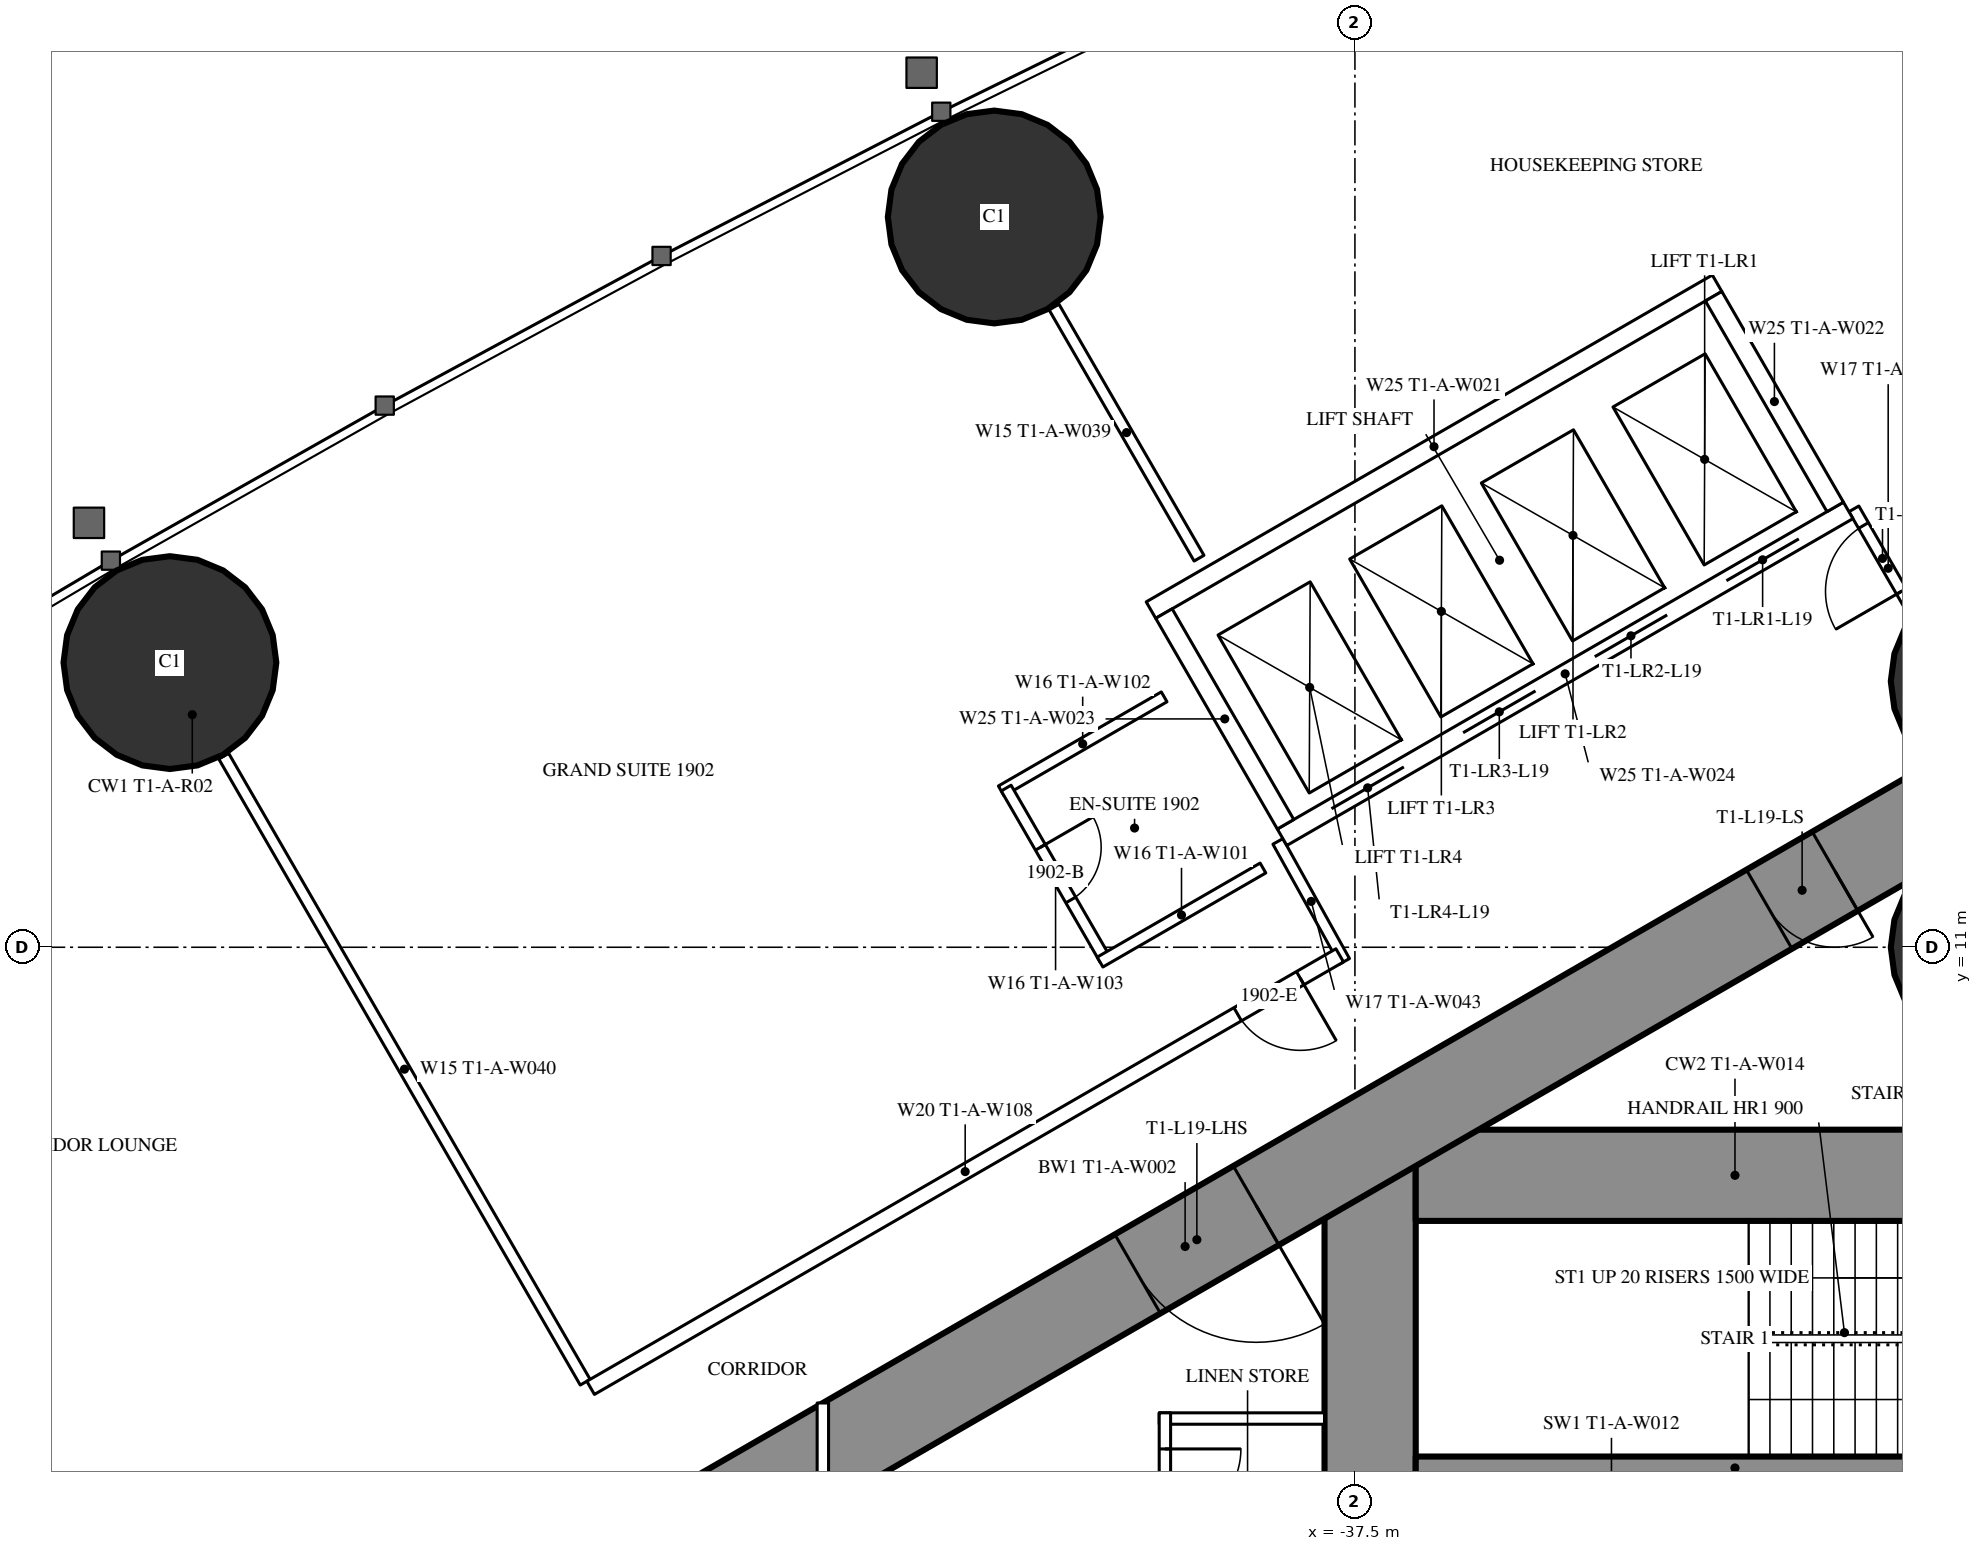
"""IFC4 building model, lengths in metres.
Left out: names, types, materials, properties, quantities, classifications, styles, units other than length and angle.
Written with IfcOpenShell. Run it as: python <this file> out.ifc"""

import sys

from ifc_helpers import new_model, si_unit, direction, frame, frame_2d, origin, origin_2d, place, context, subcontext, project, spatial, rectangle, hollow_circle, extrude, element, fill, save


model = new_model("IFC4")
c1 = context("Model", 3, precision=1e-05, world=origin(), true_north=direction((0.0, 1.0)))
c2 = subcontext(c1, "Body", "Model", "MODEL_VIEW")
j1 = project(units=[si_unit("LENGTHUNIT", "METRE"), si_unit("PLANEANGLEUNIT", "RADIAN")], contexts=[c1])
p1 = place(None, origin())
s1 = spatial("IfcSite", under=j1, at=p1, CompositionType="ELEMENT")
p2 = place(p1, origin())
s2 = spatial("IfcBuilding", under=s1, at=p2, CompositionType="ELEMENT")
p3 = place(p2, frame((0.0, 0.0, 74.0)))
s3 = spatial("IfcBuildingStorey", under=s2, at=p3, CompositionType="ELEMENT", Elevation=74.0)
for number, where, z_axis, x_axis in (
    (1, (-29.05, 11.0, 0.0), (0.0, 0.0, 1.0), (1.0, 0.0, 0.0)),
    (2, (-29.05, 14.5, 0.0), (0.0, 0.0, 1.0), (1.0, 0.0, 0.0)),
    (3, (-42.245, 20.607, 0.0), (0.0, 0.0, 1.0), (1.0, 0.0, 0.0)),
    (4, (-53.09, 14.745, 0.0), (0.0, 0.0, 1.0), (1.0, 0.0, 0.0)),
):
    element("IfcColumn", number, at=place(p3, frame(where, z_axis=z_axis, x_axis=x_axis)), inside=s3, PredefinedType="COLUMN", context=c2, shape_type="SweptSolid", body=[
        extrude(hollow_circle(Radius=1.4, WallThickness=0.12, at=origin_2d()), origin(), (0.0, 0.0, 1.0), 3.5),
    ])
p4 = place(p3, frame((-37.3, 8.6, 0.0), z_axis=(0.0, 0.0, 1.0), x_axis=(0.0, -1.0, 0.0)))
e5 = element("IfcWall", 5, at=p4, inside=s3, PredefinedType="SHEAR", context=c2, shape_type="SweptSolid", body=[
    extrude(rectangle(XDim=17.2, YDim=1.2, at=frame_2d((8.6, 0.0))), origin(), (0.0, 0.0, 1.0), 3.5),
])
p5 = place(p4, frame((7.7, 0.0, 0.0)))
e6 = element("IfcOpeningElement", 6, at=p5, cuts=e5, PredefinedType="OPENING", context=c2, shape_type="SweptSolid", body=[
    extrude(rectangle(XDim=1.8, YDim=2.2, at=frame_2d((0.9, 1.1))), frame((0.0, 0.61, 0.0), z_axis=(0.0, -1.0, 0.0), x_axis=(1.0, 0.0, 0.0)), (0.0, 0.0, 1.0), 1.22),
])
p6 = place(p3, frame((-28.3, 8.0, 0.0), z_axis=(0.0, 0.0, 1.0), x_axis=(-1.0, 0.0, 0.0)))
e7 = element("IfcWall", 7, at=p6, inside=s3, PredefinedType="SHEAR", context=c2, shape_type="SweptSolid", body=[
    extrude(rectangle(XDim=8.4, YDim=1.2, at=frame_2d((4.2, 0.0))), origin(), (0.0, 0.0, 1.0), 3.5),
])
p7 = place(p6, frame((0.25, 0.0, 0.0)))
e8 = element("IfcOpeningElement", 8, at=p7, cuts=e7, PredefinedType="OPENING", context=c2, shape_type="SweptSolid", body=[
    extrude(rectangle(XDim=1.0, YDim=2.2, at=frame_2d((0.5, 1.1))), frame((0.0, 0.61, 0.0), z_axis=(0.0, -1.0, 0.0), x_axis=(1.0, 0.0, 0.0)), (0.0, 0.0, 1.0), 1.22),
])
p8 = place(p3, frame((-28.3, 4.15, 0.0), z_axis=(0.0, 0.0, 1.0), x_axis=(-1.0, 0.0, 0.0)))
e9 = element("IfcWall", 9, at=p8, inside=s3, PredefinedType="SHEAR", context=c2, shape_type="SweptSolid", body=[
    extrude(rectangle(XDim=8.4, YDim=0.3, at=frame_2d((4.2, 0.0))), origin(), (0.0, 0.0, 1.0), 3.5),
])
p9 = place(p3, frame((-27.2, 14.3, 0.0), z_axis=(0.0, 0.0, 1.0), x_axis=(-0.866026593062, -0.499997940104, 0.0)))
e10 = element("IfcWall", 10, at=p9, inside=s3, PredefinedType="SHEAR", context=c2, shape_type="SweptSolid", body=[
    extrude(rectangle(XDim=28.946, YDim=1.2, at=frame_2d((14.473, 0.0))), origin(), (0.0, 0.0, 1.0), 3.5),
])
p10 = place(p9, frame((4.6, 0.0, 0.0)))
e11 = element("IfcOpeningElement", 11, at=p10, cuts=e10, PredefinedType="OPENING", context=c2, shape_type="SweptSolid", body=[
    extrude(rectangle(XDim=1.0, YDim=2.2, at=frame_2d((0.5, 1.1))), frame((0.0, 0.61, 0.0), z_axis=(0.0, -1.0, 0.0), x_axis=(1.0, 0.0, 0.0)), (0.0, 0.0, 1.0), 1.22),
])
p11 = place(p9, frame((13.395, 0.0, 0.0)))
e12 = element("IfcOpeningElement", 12, at=p11, cuts=e10, PredefinedType="OPENING", context=c2, shape_type="SweptSolid", body=[
    extrude(rectangle(XDim=1.8, YDim=2.2, at=frame_2d((0.9, 1.1))), frame((0.0, 0.61, 0.0), z_axis=(0.0, -1.0, 0.0), x_axis=(1.0, 0.0, 0.0)), (0.0, 0.0, 1.0), 1.22),
])
p12 = place(p3, frame((-47.627, 5.278, 0.0), z_axis=(0.0, 0.0, 1.0), x_axis=(-0.500009844318, 0.86601972009, 0.0)))
e13 = element("IfcWall", 13, at=p12, inside=s3, PredefinedType="PARTITIONING", context=c2, shape_type="SweptSolid", body=[
    extrude(rectangle(XDim=9.51, YDim=0.15, at=frame_2d((4.755, 0.0))), origin(), (0.0, 0.0, 1.0), 2.25),
])
p13 = place(p3, frame((-39.551, 16.119, 0.0), z_axis=(0.0, 0.0, 1.0), x_axis=(-0.500014214979, 0.866017196607, 0.0)))
e14 = element("IfcWall", 14, at=p13, inside=s3, PredefinedType="PARTITIONING", context=c2, shape_type="SweptSolid", body=[
    extrude(rectangle(XDim=3.815, YDim=0.15, at=frame_2d((1.907, 0.0))), origin(), (0.0, 0.0, 1.0), 3.25),
])
p14 = place(p3, frame((-38.513, 12.392, 0.0), z_axis=(0.0, 0.0, 1.0), x_axis=(0.485585508183, -0.874189175317, 0.0)))
e15 = element("IfcWall", 15, at=p14, inside=s3, PredefinedType="PARTITIONING", context=c2, shape_type="SweptSolid", body=[
    extrude(rectangle(XDim=1.805, YDim=0.15, at=frame_2d((0.902, 0.0))), origin(), (0.0, 0.0, 1.0), 3.25),
])
p15 = place(p3, frame((-30.033, 15.205, 0.0), z_axis=(0.0, 0.0, 1.0), x_axis=(-0.499980071345, 0.866036909293, 0.0)))
e16 = element("IfcWall", 16, at=p15, inside=s3, PredefinedType="PARTITIONING", context=c2, shape_type="SweptSolid", body=[
    extrude(rectangle(XDim=1.805, YDim=0.15, at=frame_2d((0.902, 0.0))), origin(), (0.0, 0.0, 1.0), 3.25),
])
p16 = place(p15, frame((0.552, 0.0, 0.0)))
e17 = element("IfcOpeningElement", 17, at=p16, cuts=e16, PredefinedType="OPENING", context=c2, shape_type="SweptSolid", body=[
    extrude(rectangle(XDim=1.0, YDim=2.2, at=frame_2d((0.5, 1.1))), frame((0.0, 0.085, 0.0), z_axis=(0.0, -1.0, 0.0), x_axis=(1.0, 0.0, 0.0)), (0.0, 0.0, 1.0), 0.17),
])
p17 = place(p3, frame((-37.7, 10.894, 0.0), z_axis=(0.0, 0.0, 1.0), x_axis=(-0.866024459167, -0.500001636122, 0.0)))
e18 = element("IfcWall", 18, at=p17, inside=s3, PredefinedType="PARTITIONING", context=c2, shape_type="SweptSolid", body=[
    extrude(rectangle(XDim=11.38, YDim=0.2, at=frame_2d((5.69, 0.0))), origin(), (0.0, 0.0, 1.0), 3.25),
])
p18 = place(p17, frame((0.6, 0.0, 0.0)))
e19 = element("IfcOpeningElement", 19, at=p18, cuts=e18, PredefinedType="OPENING", context=c2, shape_type="SweptSolid", body=[
    extrude(rectangle(XDim=0.95, YDim=2.2, at=frame_2d((0.475, 1.1))), frame((0.0, 0.11, 0.0), z_axis=(0.0, -1.0, 0.0), x_axis=(1.0, 0.0, 0.0)), (0.0, 0.0, 1.0), 0.22),
])
p19 = place(p3, frame((-40.01, 14.294, 0.0), z_axis=(0.0, 0.0, 1.0), x_axis=(-0.866031185235, -0.4999899861, 0.0)))
e20 = element("IfcWall", 20, at=p19, inside=s3, PredefinedType="PARTITIONING", context=c2, shape_type="SweptSolid", body=[
    extrude(rectangle(XDim=2.475, YDim=0.15, at=frame_2d((1.238, 0.0))), origin(), (0.0, 0.0, 1.0), 3.25),
])
p20 = place(p3, frame((-40.788, 10.843, 0.0), z_axis=(0.0, 0.0, 1.0), x_axis=(-0.500006934395, 0.866021400173, 0.0)))
e21 = element("IfcWall", 21, at=p20, inside=s3, PredefinedType="PARTITIONING", context=c2, shape_type="SweptSolid", body=[
    extrude(rectangle(XDim=2.6, YDim=0.15, at=frame_2d((1.3, 0.0))), origin(), (0.0, 0.0, 1.0), 3.25),
])
p21 = place(p20, frame((0.9, 0.0, 0.0)))
e22 = element("IfcOpeningElement", 22, at=p21, cuts=e21, PredefinedType="OPENING", context=c2, shape_type="SweptSolid", body=[
    extrude(rectangle(XDim=0.8, YDim=2.2, at=frame_2d((0.4, 1.1))), frame((0.0, 0.085, 0.0), z_axis=(0.0, -1.0, 0.0), x_axis=(1.0, 0.0, 0.0)), (0.0, 0.0, 1.0), 0.17),
])
p22 = place(p3, frame((-38.71, 12.042, 0.0), z_axis=(0.0, 0.0, 1.0), x_axis=(-0.86604923931, -0.499958713387, 0.0)))
e23 = element("IfcWall", 23, at=p22, inside=s3, PredefinedType="PARTITIONING", context=c2, shape_type="SweptSolid", body=[
    extrude(rectangle(XDim=2.475, YDim=0.15, at=frame_2d((1.237, 0.0))), origin(), (0.0, 0.0, 1.0), 3.25),
])
p23 = place(p3, frame((-37.9, 4.8, 0.0), z_axis=(0.0, 0.0, 1.0), x_axis=(-1.0, 0.0, 0.0)))
e24 = element("IfcWall", 24, at=p23, inside=s3, PredefinedType="PARTITIONING", context=c2, shape_type="SweptSolid", body=[
    extrude(rectangle(XDim=2.175, YDim=0.15, at=frame_2d((1.087, 0.0))), origin(), (0.0, 0.0, 1.0), 3.25),
])
p24 = place(p3, frame((-40.0, 4.875, 0.0), z_axis=(0.0, 0.0, 1.0), x_axis=(0.0, -1.0, 0.0)))
e25 = element("IfcWall", 25, at=p24, inside=s3, PredefinedType="PARTITIONING", context=c2, shape_type="SweptSolid", body=[
    extrude(rectangle(XDim=1.95, YDim=0.15, at=frame_2d((0.975, 0.0))), origin(), (0.0, 0.0, 1.0), 3.25),
])
p25 = place(p24, frame((0.475, 0.0, 0.0)))
e26 = element("IfcOpeningElement", 26, at=p25, cuts=e25, PredefinedType="OPENING", context=c2, shape_type="SweptSolid", body=[
    extrude(rectangle(XDim=1.0, YDim=2.2, at=frame_2d((0.5, 1.1))), frame((0.0, 0.085, 0.0), z_axis=(0.0, -1.0, 0.0), x_axis=(1.0, 0.0, 0.0)), (0.0, 0.0, 1.0), 0.17),
])
p26 = place(p3, frame((-44.5, 5.005, 0.0), z_axis=(0.0, 0.0, 1.0), x_axis=(0.0, -1.0, 0.0)))
e27 = element("IfcWall", 27, at=p26, inside=s3, PredefinedType="PARTITIONING", context=c2, shape_type="SweptSolid", body=[
    extrude(rectangle(XDim=10.009, YDim=0.15, at=frame_2d((5.005, 0.0))), origin(), (0.0, 0.0, 1.0), 2.45),
])
p27 = place(p26, frame((2.002, 0.0, 0.0)))
e28 = element("IfcOpeningElement", 28, at=p27, cuts=e27, PredefinedType="OPENING", context=c2, shape_type="SweptSolid", body=[
    extrude(rectangle(XDim=1.0, YDim=2.2, at=frame_2d((0.5, 1.1))), frame((0.0, 0.085, 0.0), z_axis=(0.0, -1.0, 0.0), x_axis=(1.0, 0.0, 0.0)), (0.0, 0.0, 1.0), 0.17),
])
p28 = place(p26, frame((7.007, 0.0, 0.0)))
e29 = element("IfcOpeningElement", 29, at=p28, cuts=e27, PredefinedType="OPENING", context=c2, shape_type="SweptSolid", body=[
    extrude(rectangle(XDim=1.0, YDim=2.2, at=frame_2d((0.5, 1.1))), frame((0.0, 0.085, 0.0), z_axis=(0.0, -1.0, 0.0), x_axis=(1.0, 0.0, 0.0)), (0.0, 0.0, 1.0), 0.17),
])
p29 = place(p3, frame((-31.01, 16.747, 0.0), z_axis=(0.0, 0.0, 1.0), x_axis=(-0.866028165386, -0.499995216735, 0.0)))
e30 = element("IfcWall", 30, at=p29, inside=s3, PredefinedType="PARTITIONING", context=c2, shape_type="SweptSolid", body=[
    extrude(rectangle(XDim=8.6, YDim=0.25, at=frame_2d((4.3, 0.0))), origin(), (0.0, 0.0, 1.0), 3.25),
])
p30 = place(p29, frame((0.75, 0.0, 0.0)))
e31 = element("IfcOpeningElement", 31, at=p30, cuts=e30, PredefinedType="OPENING", context=c2, shape_type="SweptSolid", body=[
    extrude(rectangle(XDim=1.1, YDim=2.2, at=frame_2d((0.55, 1.1))), frame((0.0, 0.135, 0.0), z_axis=(0.0, -1.0, 0.0), x_axis=(1.0, 0.0, 0.0)), (0.0, 0.0, 1.0), 0.27),
])
p31 = place(p29, frame((2.75, 0.0, 0.0)))
e32 = element("IfcOpeningElement", 32, at=p31, cuts=e30, PredefinedType="OPENING", context=c2, shape_type="SweptSolid", body=[
    extrude(rectangle(XDim=1.1, YDim=2.2, at=frame_2d((0.55, 1.1))), frame((0.0, 0.135, 0.0), z_axis=(0.0, -1.0, 0.0), x_axis=(1.0, 0.0, 0.0)), (0.0, 0.0, 1.0), 0.27),
])
p32 = place(p29, frame((4.75, 0.0, 0.0)))
e33 = element("IfcOpeningElement", 33, at=p32, cuts=e30, PredefinedType="OPENING", context=c2, shape_type="SweptSolid", body=[
    extrude(rectangle(XDim=1.1, YDim=2.2, at=frame_2d((0.55, 1.1))), frame((0.0, 0.135, 0.0), z_axis=(0.0, -1.0, 0.0), x_axis=(1.0, 0.0, 0.0)), (0.0, 0.0, 1.0), 0.27),
])
p33 = place(p29, frame((6.75, 0.0, 0.0)))
e34 = element("IfcOpeningElement", 34, at=p33, cuts=e30, PredefinedType="OPENING", context=c2, shape_type="SweptSolid", body=[
    extrude(rectangle(XDim=1.1, YDim=2.2, at=frame_2d((0.55, 1.1))), frame((0.0, 0.135, 0.0), z_axis=(0.0, -1.0, 0.0), x_axis=(1.0, 0.0, 0.0)), (0.0, 0.0, 1.0), 0.27),
])
p34 = place(p3, frame((-32.736, 19.736, 0.0), z_axis=(0.0, 0.0, 1.0), x_axis=(-0.866028165386, -0.499995216735, 0.0)))
e35 = element("IfcWall", 35, at=p34, inside=s3, PredefinedType="PARTITIONING", context=c2, shape_type="SweptSolid", body=[
    extrude(rectangle(XDim=8.6, YDim=0.25, at=frame_2d((4.3, 0.0))), origin(), (0.0, 0.0, 1.0), 3.25),
])
p35 = place(p3, frame((-31.181, 16.793, 0.0), z_axis=(0.0, 0.0, 1.0), x_axis=(-0.499929347863, 0.866066190972, 0.0)))
e36 = element("IfcWall", 36, at=p35, inside=s3, PredefinedType="PARTITIONING", context=c2, shape_type="SweptSolid", body=[
    extrude(rectangle(XDim=3.201, YDim=0.25, at=frame_2d((1.6, 0.0))), origin(), (0.0, 0.0, 1.0), 3.25),
])
p36 = place(p3, frame((-38.413, 12.618, 0.0), z_axis=(0.0, 0.0, 1.0), x_axis=(-0.499872130319, 0.866099216793, 0.0)))
e37 = element("IfcWall", 37, at=p36, inside=s3, PredefinedType="PARTITIONING", context=c2, shape_type="SweptSolid", body=[
    extrude(rectangle(XDim=3.2, YDim=0.25, at=frame_2d((1.6, 0.0))), origin(), (0.0, 0.0, 1.0), 3.25),
])
p37 = place(p21, origin())
e38 = element("IfcDoor", 38, at=p37, inside=s3, OperationType="SINGLE_SWING_RIGHT", PredefinedType="DOOR", context=c2, shape_type="SweptSolid", body=[
    extrude(rectangle(XDim=0.8, YDim=2.2, at=frame_2d((0.4, 1.1))), frame((0.0, 0.025, 0.0), z_axis=(0.0, -1.0, 0.0), x_axis=(1.0, 0.0, 0.0)), (0.0, 0.0, 1.0), 0.05),
])
fill(e22, e38)
p38 = place(p18, origin())
e39 = element("IfcDoor", 39, at=p38, inside=s3, OperationType="SINGLE_SWING_LEFT", PredefinedType="DOOR", context=c2, shape_type="SweptSolid", body=[
    extrude(rectangle(XDim=0.95, YDim=2.2, at=frame_2d((0.475, 1.1))), frame((0.0, 0.025, 0.0), z_axis=(0.0, -1.0, 0.0), x_axis=(1.0, 0.0, 0.0)), (0.0, 0.0, 1.0), 0.05),
])
fill(e19, e39)
p39 = place(p16, origin())
e40 = element("IfcDoor", 40, at=p39, inside=s3, OperationType="SINGLE_SWING_LEFT", PredefinedType="DOOR", context=c2, shape_type="SweptSolid", body=[
    extrude(rectangle(XDim=1.0, YDim=2.2, at=frame_2d((0.5, 1.1))), frame((0.0, 0.025, 0.0), z_axis=(0.0, -1.0, 0.0), x_axis=(1.0, 0.0, 0.0)), (0.0, 0.0, 1.0), 0.05),
])
fill(e17, e40)
p40 = place(p25, origin())
e41 = element("IfcDoor", 41, at=p40, inside=s3, OperationType="SINGLE_SWING_LEFT", PredefinedType="DOOR", context=c2, shape_type="SweptSolid", body=[
    extrude(rectangle(XDim=1.0, YDim=2.2, at=frame_2d((0.5, 1.1))), frame((0.0, 0.025, 0.0), z_axis=(0.0, -1.0, 0.0), x_axis=(1.0, 0.0, 0.0)), (0.0, 0.0, 1.0), 0.05),
])
fill(e26, e41)
p41 = place(p10, origin())
e42 = element("IfcDoor", 42, at=p41, inside=s3, OperationType="SINGLE_SWING_LEFT", PredefinedType="DOOR", context=c2, shape_type="SweptSolid", body=[
    extrude(rectangle(XDim=1.0, YDim=2.2, at=frame_2d((0.5, 1.1))), frame((0.0, 0.025, 0.0), z_axis=(0.0, -1.0, 0.0), x_axis=(1.0, 0.0, 0.0)), (0.0, 0.0, 1.0), 0.05),
])
fill(e11, e42)
p42 = place(p11, origin())
e43 = element("IfcDoor", 43, at=p42, inside=s3, OperationType="DOUBLE_DOOR_SINGLE_SWING", PredefinedType="DOOR", context=c2, shape_type="SweptSolid", body=[
    extrude(rectangle(XDim=1.8, YDim=2.2, at=frame_2d((0.9, 1.1))), frame((0.0, 0.025, 0.0), z_axis=(0.0, -1.0, 0.0), x_axis=(1.0, 0.0, 0.0)), (0.0, 0.0, 1.0), 0.05),
])
fill(e12, e43)
p43 = place(p30, origin())
e44 = element("IfcDoor", 44, at=p43, inside=s3, OperationType="DOUBLE_DOOR_SLIDING", PredefinedType="USERDEFINED", context=c2, shape_type="SweptSolid", body=[
    extrude(rectangle(XDim=1.1, YDim=2.2, at=frame_2d((0.55, 1.1))), frame((0.0, 0.025, 0.0), z_axis=(0.0, -1.0, 0.0), x_axis=(1.0, 0.0, 0.0)), (0.0, 0.0, 1.0), 0.05),
])
fill(e31, e44)
p44 = place(p31, origin())
e45 = element("IfcDoor", 45, at=p44, inside=s3, OperationType="DOUBLE_DOOR_SLIDING", PredefinedType="USERDEFINED", context=c2, shape_type="SweptSolid", body=[
    extrude(rectangle(XDim=1.1, YDim=2.2, at=frame_2d((0.55, 1.1))), frame((0.0, 0.025, 0.0), z_axis=(0.0, -1.0, 0.0), x_axis=(1.0, 0.0, 0.0)), (0.0, 0.0, 1.0), 0.05),
])
fill(e32, e45)
p45 = place(p32, origin())
e46 = element("IfcDoor", 46, at=p45, inside=s3, OperationType="DOUBLE_DOOR_SLIDING", PredefinedType="USERDEFINED", context=c2, shape_type="SweptSolid", body=[
    extrude(rectangle(XDim=1.1, YDim=2.2, at=frame_2d((0.55, 1.1))), frame((0.0, 0.025, 0.0), z_axis=(0.0, -1.0, 0.0), x_axis=(1.0, 0.0, 0.0)), (0.0, 0.0, 1.0), 0.05),
])
fill(e33, e46)
p46 = place(p33, origin())
e47 = element("IfcDoor", 47, at=p46, inside=s3, OperationType="DOUBLE_DOOR_SLIDING", PredefinedType="USERDEFINED", context=c2, shape_type="SweptSolid", body=[
    extrude(rectangle(XDim=1.1, YDim=2.2, at=frame_2d((0.55, 1.1))), frame((0.0, 0.025, 0.0), z_axis=(0.0, -1.0, 0.0), x_axis=(1.0, 0.0, 0.0)), (0.0, 0.0, 1.0), 0.05),
])
fill(e34, e47)
save(model, sys.argv[1])
